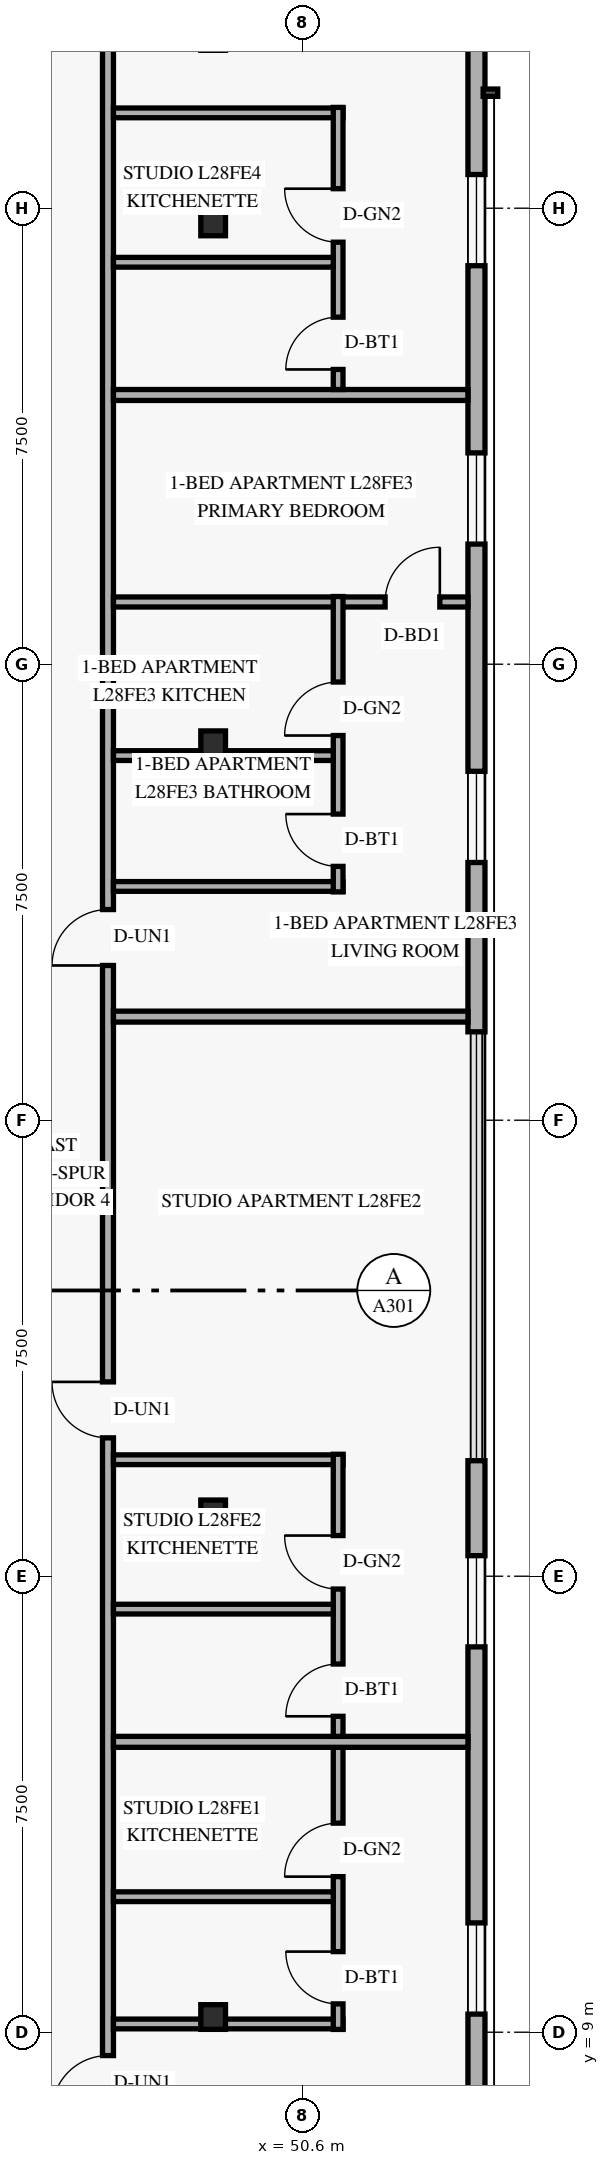
"""IFC4 building model, lengths in metres.
Left out: names, types, materials, properties, quantities, classifications, styles, units other than length and angle.
Written with IfcOpenShell. Run it as: python <this file> out.ifc"""

import sys

from ifc_helpers import new_model, si_unit, direction, frame, frame_2d, origin, origin_2d, place, context, subcontext, project, spatial, rectangle, hollow_rectangle, extrude, element, fill, save


model = new_model("IFC4")
c1 = context("Model", 3, precision=1e-05, world=origin(), true_north=direction((0.0, 1.0)))
c2 = subcontext(c1, "Body", "Model", "MODEL_VIEW")
j1 = project(units=[si_unit("LENGTHUNIT", "METRE"), si_unit("PLANEANGLEUNIT", "RADIAN")], contexts=[c1])
p1 = place(None, origin())
s1 = spatial("IfcSite", under=j1, at=p1, CompositionType="ELEMENT")
p2 = place(p1, origin())
s2 = spatial("IfcBuilding", under=s1, at=p2, CompositionType="ELEMENT")
p3 = place(p2, frame((0.0, 0.0, 109.8)))
s3 = spatial("IfcBuildingStorey", under=s2, at=p3, CompositionType="ELEMENT", Elevation=109.8)
for number, where, z_axis, x_axis in (
    (1, (49.025, 9.25, 0.0), (0.058, 0.0, 0.998), (0.0, 1.0, 0.0)),
    (2, (49.025, 17.55, 0.0), (0.058, 0.0, 0.998), (0.0, 1.0, 0.0)),
    (3, (49.025, 30.2, 0.0), (0.058, 0.0, 0.998), (0.0, 1.0, 0.0)),
    (4, (49.025, 38.75, 0.0), (0.058, 0.0, 0.998), (0.0, 1.0, 0.0)),
):
    element("IfcColumn", number, at=place(p3, frame(where, z_axis=z_axis, x_axis=x_axis)), inside=s3, PredefinedType="COLUMN", context=c2, shape_type="SweptSolid", body=[
        extrude(hollow_rectangle(XDim=0.406, YDim=0.406, WallThickness=0.016, at=origin_2d()), origin(), (0.0, 0.0, 1.0), 3.606),
    ])
p4 = place(p3, frame((53.46, 6.32, 0.0), z_axis=(0.0, 0.0, 1.0), x_axis=(0.0, 1.0, 0.0)))
e5 = element("IfcWall", 5, at=p4, inside=s3, PredefinedType="SOLIDWALL", context=c2, shape_type="SweptSolid", body=[
    extrude(rectangle(XDim=12.08, YDim=0.28, at=frame_2d((6.04, 0.0))), origin(), (0.0, 0.0, 1.0), 3.36),
])
p5 = place(p4, frame((2.978, 0.0, 0.85)))
e6 = element("IfcOpeningElement", 6, at=p5, cuts=e5, PredefinedType="OPENING", context=c2, shape_type="SweptSolid", body=[
    extrude(rectangle(XDim=1.5, YDim=1.55, at=frame_2d((0.75, 0.775))), frame((0.0, 0.15, 0.0), z_axis=(0.0, -1.0, 0.0), x_axis=(1.0, 0.0, 0.0)), (0.0, 0.0, 1.0), 0.3),
])
p6 = place(p4, frame((9.018, 0.0, 0.85)))
e7 = element("IfcOpeningElement", 7, at=p6, cuts=e5, PredefinedType="OPENING", context=c2, shape_type="SweptSolid", body=[
    extrude(rectangle(XDim=1.5, YDim=1.55, at=frame_2d((0.75, 0.775))), frame((0.0, 0.15, 0.0), z_axis=(0.0, -1.0, 0.0), x_axis=(1.0, 0.0, 0.0)), (0.0, 0.0, 1.0), 0.3),
])
p7 = place(p3, frame((53.46, 25.454, 0.0), z_axis=(0.0, 0.0, 1.0), x_axis=(0.0, 1.0, 0.0)))
e8 = element("IfcWall", 8, at=p7, inside=s3, PredefinedType="SOLIDWALL", context=c2, shape_type="SweptSolid", body=[
    extrude(rectangle(XDim=16.226, YDim=0.28, at=frame_2d((8.113, 0.0))), origin(), (0.0, 0.0, 1.0), 3.36),
])
p8 = place(p7, frame((2.785, 0.0, 0.85)))
e9 = element("IfcOpeningElement", 9, at=p8, cuts=e8, PredefinedType="OPENING", context=c2, shape_type="SweptSolid", body=[
    extrude(rectangle(XDim=1.5, YDim=1.55, at=frame_2d((0.75, 0.775))), frame((0.0, 0.15, 0.0), z_axis=(0.0, -1.0, 0.0), x_axis=(1.0, 0.0, 0.0)), (0.0, 0.0, 1.0), 0.3),
])
p9 = place(p7, frame((8.022, 0.0, 0.85)))
e10 = element("IfcOpeningElement", 10, at=p9, cuts=e8, PredefinedType="OPENING", context=c2, shape_type="SweptSolid", body=[
    extrude(rectangle(XDim=1.5, YDim=1.55, at=frame_2d((0.75, 0.775))), frame((0.0, 0.15, 0.0), z_axis=(0.0, -1.0, 0.0), x_axis=(1.0, 0.0, 0.0)), (0.0, 0.0, 1.0), 0.3),
])
p10 = place(p7, frame((12.6, 0.0, 0.85)))
e11 = element("IfcOpeningElement", 11, at=p10, cuts=e8, PredefinedType="OPENING", context=c2, shape_type="SweptSolid", body=[
    extrude(rectangle(XDim=1.5, YDim=1.55, at=frame_2d((0.75, 0.775))), frame((0.0, 0.15, 0.0), z_axis=(0.0, -1.0, 0.0), x_axis=(1.0, 0.0, 0.0)), (0.0, 0.0, 1.0), 0.3),
])
p11 = place(p3, frame((47.4, 2.98, 0.0), z_axis=(0.0, 0.0, 1.0), x_axis=(0.0, 1.0, 0.0)))
e12 = element("IfcWall", 12, at=p11, inside=s3, PredefinedType="STANDARD", context=c2, shape_type="SweptSolid", body=[
    extrude(rectangle(XDim=42.04, YDim=0.18, at=frame_2d((21.02, 0.0))), origin(), (0.0, 0.0, 1.0), 2.731),
])
p12 = place(p11, frame((4.716, 0.0, 0.0)))
e13 = element("IfcOpeningElement", 13, at=p12, cuts=e12, PredefinedType="OPENING", context=c2, shape_type="SweptSolid", body=[
    extrude(rectangle(XDim=0.92, YDim=2.15, at=frame_2d((0.46, 1.075))), frame((0.0, 0.1, 0.0), z_axis=(0.0, -1.0, 0.0), x_axis=(1.0, 0.0, 0.0)), (0.0, 0.0, 1.0), 0.2),
])
p13 = place(p11, frame((15.796, 0.0, 0.0)))
e14 = element("IfcOpeningElement", 14, at=p13, cuts=e12, PredefinedType="OPENING", context=c2, shape_type="SweptSolid", body=[
    extrude(rectangle(XDim=0.92, YDim=2.15, at=frame_2d((0.46, 1.075))), frame((0.0, 0.1, 0.0), z_axis=(0.0, -1.0, 0.0), x_axis=(1.0, 0.0, 0.0)), (0.0, 0.0, 1.0), 0.2),
])
p14 = place(p11, frame((23.565, 0.0, 0.0)))
e15 = element("IfcOpeningElement", 15, at=p14, cuts=e12, PredefinedType="OPENING", context=c2, shape_type="SweptSolid", body=[
    extrude(rectangle(XDim=0.92, YDim=2.15, at=frame_2d((0.46, 1.075))), frame((0.0, 0.1, 0.0), z_axis=(0.0, -1.0, 0.0), x_axis=(1.0, 0.0, 0.0)), (0.0, 0.0, 1.0), 0.2),
])
p15 = place(p11, frame((39.348, 0.0, 0.0)))
e16 = element("IfcOpeningElement", 16, at=p15, cuts=e12, PredefinedType="OPENING", context=c2, shape_type="SweptSolid", body=[
    extrude(rectangle(XDim=0.92, YDim=2.15, at=frame_2d((0.46, 1.075))), frame((0.0, 0.1, 0.0), z_axis=(0.0, -1.0, 0.0), x_axis=(1.0, 0.0, 0.0)), (0.0, 0.0, 1.0), 0.2),
])
p16 = place(p3, frame((47.49, 9.136, 0.0), z_axis=(0.0, 0.0, 1.0), x_axis=(1.0, 0.0, 0.0)))
e17 = element("IfcWall", 17, at=p16, inside=s3, PredefinedType="PLUMBINGWALL", context=c2, shape_type="SweptSolid", body=[
    extrude(rectangle(XDim=3.775, YDim=0.16, at=frame_2d((1.888, 0.0))), origin(), (0.0, 0.0, 1.0), 2.731),
])
p17 = place(p3, frame((51.185, 9.046, 0.0), z_axis=(0.0, 0.0, 1.0), x_axis=(0.0, 1.0, 0.0)))
e18 = element("IfcWall", 18, at=p17, inside=s3, PredefinedType="PLUMBINGWALL", context=c2, shape_type="SweptSolid", body=[
    extrude(rectangle(XDim=4.73, YDim=0.16, at=frame_2d((2.365, 0.0))), origin(), (0.0, 0.0, 1.0), 3.36),
])
p18 = place(p17, frame((0.42, 0.0, 0.0)))
e19 = element("IfcOpeningElement", 19, at=p18, cuts=e18, PredefinedType="OPENING", context=c2, shape_type="SweptSolid", body=[
    extrude(rectangle(XDim=0.86, YDim=2.12, at=frame_2d((0.43, 1.06))), frame((0.0, 0.09, 0.0), z_axis=(0.0, -1.0, 0.0), x_axis=(1.0, 0.0, 0.0)), (0.0, 0.0, 1.0), 0.18),
])
p19 = place(p17, frame((2.513, 0.0, 0.0)))
e20 = element("IfcOpeningElement", 20, at=p19, cuts=e18, PredefinedType="OPENING", context=c2, shape_type="SweptSolid", body=[
    extrude(rectangle(XDim=0.88, YDim=2.12, at=frame_2d((0.44, 1.06))), frame((0.0, 0.09, 0.0), z_axis=(0.0, -1.0, 0.0), x_axis=(1.0, 0.0, 0.0)), (0.0, 0.0, 1.0), 0.18),
])
p20 = place(p3, frame((47.49, 11.229, 0.0), z_axis=(0.0, 0.0, 1.0), x_axis=(1.0, 0.0, 0.0)))
e21 = element("IfcWall", 21, at=p20, inside=s3, PredefinedType="PLUMBINGWALL", context=c2, shape_type="SweptSolid", body=[
    extrude(rectangle(XDim=3.615, YDim=0.16, at=frame_2d((1.808, 0.0))), origin(), (0.0, 0.0, 1.0), 2.809),
])
p21 = place(p3, frame((47.49, 13.776, 0.0), z_axis=(0.0, 0.0, 1.0), x_axis=(1.0, 0.0, 0.0)))
e22 = element("IfcWall", 22, at=p21, inside=s3, PredefinedType="PARTITIONING", context=c2, shape_type="SweptSolid", body=[
    extrude(rectangle(XDim=5.83, YDim=0.18, at=frame_2d((2.915, 0.0))), origin(), (0.0, 0.0, 1.0), 2.809),
])
p22 = place(p3, frame((47.49, 18.416, 0.0), z_axis=(0.0, 0.0, 1.0), x_axis=(1.0, 0.0, 0.0)))
e23 = element("IfcWall", 23, at=p22, inside=s3, PredefinedType="PLUMBINGWALL", context=c2, shape_type="SweptSolid", body=[
    extrude(rectangle(XDim=3.775, YDim=0.16, at=frame_2d((1.888, 0.0))), origin(), (0.0, 0.0, 1.0), 2.809),
])
p23 = place(p3, frame((51.185, 13.866, 0.0), z_axis=(0.0, 0.0, 1.0), x_axis=(0.0, 1.0, 0.0)))
e24 = element("IfcWall", 24, at=p23, inside=s3, PredefinedType="PLUMBINGWALL", context=c2, shape_type="SweptSolid", body=[
    extrude(rectangle(XDim=4.64, YDim=0.16, at=frame_2d((2.32, 0.0))), origin(), (0.0, 0.0, 1.0), 3.36),
])
p24 = place(p23, frame((0.33, 0.0, 0.0)))
e25 = element("IfcOpeningElement", 25, at=p24, cuts=e24, PredefinedType="OPENING", context=c2, shape_type="SweptSolid", body=[
    extrude(rectangle(XDim=0.86, YDim=2.12, at=frame_2d((0.43, 1.06))), frame((0.0, 0.09, 0.0), z_axis=(0.0, -1.0, 0.0), x_axis=(1.0, 0.0, 0.0)), (0.0, 0.0, 1.0), 0.18),
])
p25 = place(p23, frame((2.423, 0.0, 0.0)))
e26 = element("IfcOpeningElement", 26, at=p25, cuts=e24, PredefinedType="OPENING", context=c2, shape_type="SweptSolid", body=[
    extrude(rectangle(XDim=0.88, YDim=2.12, at=frame_2d((0.44, 1.06))), frame((0.0, 0.09, 0.0), z_axis=(0.0, -1.0, 0.0), x_axis=(1.0, 0.0, 0.0)), (0.0, 0.0, 1.0), 0.18),
])
p26 = place(p3, frame((47.49, 15.959, 0.0), z_axis=(0.0, 0.0, 1.0), x_axis=(1.0, 0.0, 0.0)))
e27 = element("IfcWall", 27, at=p26, inside=s3, PredefinedType="PLUMBINGWALL", context=c2, shape_type="SweptSolid", body=[
    extrude(rectangle(XDim=3.615, YDim=0.16, at=frame_2d((1.808, 0.0))), origin(), (0.0, 0.0, 1.0), 2.809),
])
p27 = place(p3, frame((47.49, 25.704, 0.0), z_axis=(0.0, 0.0, 1.0), x_axis=(1.0, 0.0, 0.0)))
e28 = element("IfcWall", 28, at=p27, inside=s3, PredefinedType="PARTITIONING", context=c2, shape_type="SweptSolid", body=[
    extrude(rectangle(XDim=5.83, YDim=0.18, at=frame_2d((2.915, 0.0))), origin(), (0.0, 0.0, 1.0), 2.809),
])
p28 = place(p3, frame((47.49, 32.523, 0.0), z_axis=(0.0, 0.0, 1.0), x_axis=(1.0, 0.0, 0.0)))
e29 = element("IfcWall", 29, at=p28, inside=s3, PredefinedType="PARTITIONING", context=c2, shape_type="SweptSolid", body=[
    extrude(rectangle(XDim=5.83, YDim=0.165, at=frame_2d((2.915, 0.0))), origin(), (0.0, 0.0, 1.0), 2.809),
])
p29 = place(p28, frame((4.468, 0.0, 0.0)))
e30 = element("IfcOpeningElement", 30, at=p29, cuts=e29, PredefinedType="OPENING", context=c2, shape_type="SweptSolid", body=[
    extrude(rectangle(XDim=0.9, YDim=2.14, at=frame_2d((0.45, 1.07))), frame((0.0, 0.093, 0.0), z_axis=(0.0, -1.0, 0.0), x_axis=(1.0, 0.0, 0.0)), (0.0, 0.0, 1.0), 0.185),
])
p30 = place(p3, frame((47.49, 27.845, 0.0), z_axis=(0.0, 0.0, 1.0), x_axis=(1.0, 0.0, 0.0)))
e31 = element("IfcWall", 31, at=p30, inside=s3, PredefinedType="PLUMBINGWALL", context=c2, shape_type="SweptSolid", body=[
    extrude(rectangle(XDim=3.775, YDim=0.16, at=frame_2d((1.888, 0.0))), origin(), (0.0, 0.0, 1.0), 2.809),
])
p31 = place(p3, frame((51.185, 27.755, 0.0), z_axis=(0.0, 0.0, 1.0), x_axis=(0.0, 1.0, 0.0)))
e32 = element("IfcWall", 32, at=p31, inside=s3, PredefinedType="PLUMBINGWALL", context=c2, shape_type="SweptSolid", body=[
    extrude(rectangle(XDim=4.859, YDim=0.16, at=frame_2d((2.429, 0.0))), origin(), (0.0, 0.0, 1.0), 3.36),
])
p32 = place(p31, frame((0.42, 0.0, 0.0)))
e33 = element("IfcOpeningElement", 33, at=p32, cuts=e32, PredefinedType="OPENING", context=c2, shape_type="SweptSolid", body=[
    extrude(rectangle(XDim=0.86, YDim=2.12, at=frame_2d((0.43, 1.06))), frame((0.0, 0.09, 0.0), z_axis=(0.0, -1.0, 0.0), x_axis=(1.0, 0.0, 0.0)), (0.0, 0.0, 1.0), 0.18),
])
p33 = place(p31, frame((2.572, 0.0, 0.0)))
e34 = element("IfcOpeningElement", 34, at=p33, cuts=e32, PredefinedType="OPENING", context=c2, shape_type="SweptSolid", body=[
    extrude(rectangle(XDim=0.88, YDim=2.12, at=frame_2d((0.44, 1.06))), frame((0.0, 0.09, 0.0), z_axis=(0.0, -1.0, 0.0), x_axis=(1.0, 0.0, 0.0)), (0.0, 0.0, 1.0), 0.18),
])
p34 = place(p3, frame((47.49, 29.997, 0.0), z_axis=(0.0, 0.0, 1.0), x_axis=(1.0, 0.0, 0.0)))
e35 = element("IfcWall", 35, at=p34, inside=s3, PredefinedType="PLUMBINGWALL", context=c2, shape_type="SweptSolid", body=[
    extrude(rectangle(XDim=3.615, YDim=0.16, at=frame_2d((1.808, 0.0))), origin(), (0.0, 0.0, 1.0), 2.731),
])
p35 = place(p3, frame((47.49, 35.928, 0.0), z_axis=(0.0, 0.0, 1.0), x_axis=(1.0, 0.0, 0.0)))
e36 = element("IfcWall", 36, at=p35, inside=s3, PredefinedType="PARTITIONING", context=c2, shape_type="SweptSolid", body=[
    extrude(rectangle(XDim=5.83, YDim=0.18, at=frame_2d((2.915, 0.0))), origin(), (0.0, 0.0, 1.0), 2.809),
])
p36 = place(p3, frame((47.49, 40.568, 0.0), z_axis=(0.0, 0.0, 1.0), x_axis=(1.0, 0.0, 0.0)))
e37 = element("IfcWall", 37, at=p36, inside=s3, PredefinedType="PLUMBINGWALL", context=c2, shape_type="SweptSolid", body=[
    extrude(rectangle(XDim=3.775, YDim=0.16, at=frame_2d((1.888, 0.0))), origin(), (0.0, 0.0, 1.0), 2.809),
])
p37 = place(p3, frame((51.185, 36.018, 0.0), z_axis=(0.0, 0.0, 1.0), x_axis=(0.0, 1.0, 0.0)))
e38 = element("IfcWall", 38, at=p37, inside=s3, PredefinedType="PLUMBINGWALL", context=c2, shape_type="SweptSolid", body=[
    extrude(rectangle(XDim=4.64, YDim=0.16, at=frame_2d((2.32, 0.0))), origin(), (0.0, 0.0, 1.0), 3.36),
])
p38 = place(p37, frame((0.33, 0.0, 0.0)))
e39 = element("IfcOpeningElement", 39, at=p38, cuts=e38, PredefinedType="OPENING", context=c2, shape_type="SweptSolid", body=[
    extrude(rectangle(XDim=0.86, YDim=2.12, at=frame_2d((0.43, 1.06))), frame((0.0, 0.09, 0.0), z_axis=(0.0, -1.0, 0.0), x_axis=(1.0, 0.0, 0.0)), (0.0, 0.0, 1.0), 0.18),
])
p39 = place(p37, frame((2.423, 0.0, 0.0)))
e40 = element("IfcOpeningElement", 40, at=p39, cuts=e38, PredefinedType="OPENING", context=c2, shape_type="SweptSolid", body=[
    extrude(rectangle(XDim=0.88, YDim=2.12, at=frame_2d((0.44, 1.06))), frame((0.0, 0.09, 0.0), z_axis=(0.0, -1.0, 0.0), x_axis=(1.0, 0.0, 0.0)), (0.0, 0.0, 1.0), 0.18),
])
p40 = place(p3, frame((47.49, 38.111, 0.0), z_axis=(0.0, 0.0, 1.0), x_axis=(1.0, 0.0, 0.0)))
e41 = element("IfcWall", 41, at=p40, inside=s3, PredefinedType="PLUMBINGWALL", context=c2, shape_type="SweptSolid", body=[
    extrude(rectangle(XDim=3.615, YDim=0.16, at=frame_2d((1.808, 0.0))), origin(), (0.0, 0.0, 1.0), 2.809),
])
p41 = place(p5, origin())
e42 = element("IfcWindow", 42, at=p41, inside=s3, PartitioningType="SINGLE_PANEL", PredefinedType="WINDOW", context=c2, shape_type="SweptSolid", body=[
    extrude(rectangle(XDim=1.5, YDim=1.55, at=frame_2d((0.75, 0.775))), frame((0.0, 0.03, 0.0), z_axis=(0.0, -1.0, 0.0), x_axis=(1.0, 0.0, 0.0)), (0.0, 0.0, 1.0), 0.06),
])
fill(e6, e42)
p42 = place(p6, origin())
e43 = element("IfcWindow", 43, at=p42, inside=s3, PartitioningType="SINGLE_PANEL", PredefinedType="WINDOW", context=c2, shape_type="SweptSolid", body=[
    extrude(rectangle(XDim=1.5, YDim=1.55, at=frame_2d((0.75, 0.775))), frame((0.0, 0.03, 0.0), z_axis=(0.0, -1.0, 0.0), x_axis=(1.0, 0.0, 0.0)), (0.0, 0.0, 1.0), 0.06),
])
fill(e7, e43)
p43 = place(p8, origin())
e44 = element("IfcWindow", 44, at=p43, inside=s3, PartitioningType="SINGLE_PANEL", PredefinedType="WINDOW", context=c2, shape_type="SweptSolid", body=[
    extrude(rectangle(XDim=1.5, YDim=1.55, at=frame_2d((0.75, 0.775))), frame((0.0, 0.03, 0.0), z_axis=(0.0, -1.0, 0.0), x_axis=(1.0, 0.0, 0.0)), (0.0, 0.0, 1.0), 0.06),
])
fill(e9, e44)
p44 = place(p9, origin())
e45 = element("IfcWindow", 45, at=p44, inside=s3, PartitioningType="SINGLE_PANEL", PredefinedType="WINDOW", context=c2, shape_type="SweptSolid", body=[
    extrude(rectangle(XDim=1.5, YDim=1.55, at=frame_2d((0.75, 0.775))), frame((0.0, 0.03, 0.0), z_axis=(0.0, -1.0, 0.0), x_axis=(1.0, 0.0, 0.0)), (0.0, 0.0, 1.0), 0.06),
])
fill(e10, e45)
p45 = place(p10, origin())
e46 = element("IfcWindow", 46, at=p45, inside=s3, PartitioningType="SINGLE_PANEL", PredefinedType="WINDOW", context=c2, shape_type="SweptSolid", body=[
    extrude(rectangle(XDim=1.5, YDim=1.55, at=frame_2d((0.75, 0.775))), frame((0.0, 0.03, 0.0), z_axis=(0.0, -1.0, 0.0), x_axis=(1.0, 0.0, 0.0)), (0.0, 0.0, 1.0), 0.06),
])
fill(e11, e46)
p46 = place(p12, origin())
e47 = element("IfcDoor", 47, at=p46, inside=s3, OperationType="SINGLE_SWING_LEFT", PredefinedType="DOOR", context=c2, shape_type="SweptSolid", body=[
    extrude(rectangle(XDim=0.92, YDim=2.15, at=frame_2d((0.46, 1.075))), frame((0.0, 0.025, 0.0), z_axis=(0.0, -1.0, 0.0), x_axis=(1.0, 0.0, 0.0)), (0.0, 0.0, 1.0), 0.05),
])
fill(e13, e47)
p47 = place(p18, origin())
e48 = element("IfcDoor", 48, at=p47, inside=s3, OperationType="SINGLE_SWING_RIGHT", PredefinedType="DOOR", context=c2, shape_type="SweptSolid", body=[
    extrude(rectangle(XDim=0.86, YDim=2.12, at=frame_2d((0.43, 1.06))), frame((0.0, 0.025, 0.0), z_axis=(0.0, -1.0, 0.0), x_axis=(1.0, 0.0, 0.0)), (0.0, 0.0, 1.0), 0.05),
])
fill(e19, e48)
p48 = place(p19, origin())
e49 = element("IfcDoor", 49, at=p48, inside=s3, OperationType="SINGLE_SWING_LEFT", PredefinedType="DOOR", context=c2, shape_type="SweptSolid", body=[
    extrude(rectangle(XDim=0.88, YDim=2.12, at=frame_2d((0.44, 1.06))), frame((0.0, 0.025, 0.0), z_axis=(0.0, -1.0, 0.0), x_axis=(1.0, 0.0, 0.0)), (0.0, 0.0, 1.0), 0.05),
])
fill(e20, e49)
p49 = place(p13, origin())
e50 = element("IfcDoor", 50, at=p49, inside=s3, OperationType="SINGLE_SWING_RIGHT", PredefinedType="DOOR", context=c2, shape_type="SweptSolid", body=[
    extrude(rectangle(XDim=0.92, YDim=2.15, at=frame_2d((0.46, 1.075))), frame((0.0, 0.025, 0.0), z_axis=(0.0, -1.0, 0.0), x_axis=(1.0, 0.0, 0.0)), (0.0, 0.0, 1.0), 0.05),
])
fill(e14, e50)
p50 = place(p24, origin())
e51 = element("IfcDoor", 51, at=p50, inside=s3, OperationType="SINGLE_SWING_LEFT", PredefinedType="DOOR", context=c2, shape_type="SweptSolid", body=[
    extrude(rectangle(XDim=0.86, YDim=2.12, at=frame_2d((0.43, 1.06))), frame((0.0, 0.025, 0.0), z_axis=(0.0, -1.0, 0.0), x_axis=(1.0, 0.0, 0.0)), (0.0, 0.0, 1.0), 0.05),
])
fill(e25, e51)
p51 = place(p25, origin())
e52 = element("IfcDoor", 52, at=p51, inside=s3, OperationType="SINGLE_SWING_RIGHT", PredefinedType="DOOR", context=c2, shape_type="SweptSolid", body=[
    extrude(rectangle(XDim=0.88, YDim=2.12, at=frame_2d((0.44, 1.06))), frame((0.0, 0.025, 0.0), z_axis=(0.0, -1.0, 0.0), x_axis=(1.0, 0.0, 0.0)), (0.0, 0.0, 1.0), 0.05),
])
fill(e26, e52)
p52 = place(p14, origin())
e53 = element("IfcDoor", 53, at=p52, inside=s3, OperationType="SINGLE_SWING_LEFT", PredefinedType="DOOR", context=c2, shape_type="SweptSolid", body=[
    extrude(rectangle(XDim=0.92, YDim=2.15, at=frame_2d((0.46, 1.075))), frame((0.0, 0.025, 0.0), z_axis=(0.0, -1.0, 0.0), x_axis=(1.0, 0.0, 0.0)), (0.0, 0.0, 1.0), 0.05),
])
fill(e15, e53)
p53 = place(p32, origin())
e54 = element("IfcDoor", 54, at=p53, inside=s3, OperationType="SINGLE_SWING_RIGHT", PredefinedType="DOOR", context=c2, shape_type="SweptSolid", body=[
    extrude(rectangle(XDim=0.86, YDim=2.12, at=frame_2d((0.43, 1.06))), frame((0.0, 0.025, 0.0), z_axis=(0.0, -1.0, 0.0), x_axis=(1.0, 0.0, 0.0)), (0.0, 0.0, 1.0), 0.05),
])
fill(e33, e54)
p54 = place(p33, origin())
e55 = element("IfcDoor", 55, at=p54, inside=s3, OperationType="SINGLE_SWING_LEFT", PredefinedType="DOOR", context=c2, shape_type="SweptSolid", body=[
    extrude(rectangle(XDim=0.88, YDim=2.12, at=frame_2d((0.44, 1.06))), frame((0.0, 0.025, 0.0), z_axis=(0.0, -1.0, 0.0), x_axis=(1.0, 0.0, 0.0)), (0.0, 0.0, 1.0), 0.05),
])
fill(e34, e55)
p55 = place(p29, origin())
e56 = element("IfcDoor", 56, at=p55, inside=s3, OperationType="SINGLE_SWING_RIGHT", PredefinedType="DOOR", context=c2, shape_type="SweptSolid", body=[
    extrude(rectangle(XDim=0.9, YDim=2.14, at=frame_2d((0.45, 1.07))), frame((0.0, 0.025, 0.0), z_axis=(0.0, -1.0, 0.0), x_axis=(1.0, 0.0, 0.0)), (0.0, 0.0, 1.0), 0.05),
])
fill(e30, e56)
p56 = place(p38, origin())
e57 = element("IfcDoor", 57, at=p56, inside=s3, OperationType="SINGLE_SWING_LEFT", PredefinedType="DOOR", context=c2, shape_type="SweptSolid", body=[
    extrude(rectangle(XDim=0.86, YDim=2.12, at=frame_2d((0.43, 1.06))), frame((0.0, 0.025, 0.0), z_axis=(0.0, -1.0, 0.0), x_axis=(1.0, 0.0, 0.0)), (0.0, 0.0, 1.0), 0.05),
])
fill(e39, e57)
p57 = place(p39, origin())
e58 = element("IfcDoor", 58, at=p57, inside=s3, OperationType="SINGLE_SWING_RIGHT", PredefinedType="DOOR", context=c2, shape_type="SweptSolid", body=[
    extrude(rectangle(XDim=0.88, YDim=2.12, at=frame_2d((0.44, 1.06))), frame((0.0, 0.025, 0.0), z_axis=(0.0, -1.0, 0.0), x_axis=(1.0, 0.0, 0.0)), (0.0, 0.0, 1.0), 0.05),
])
fill(e40, e58)
save(model, sys.argv[1])
